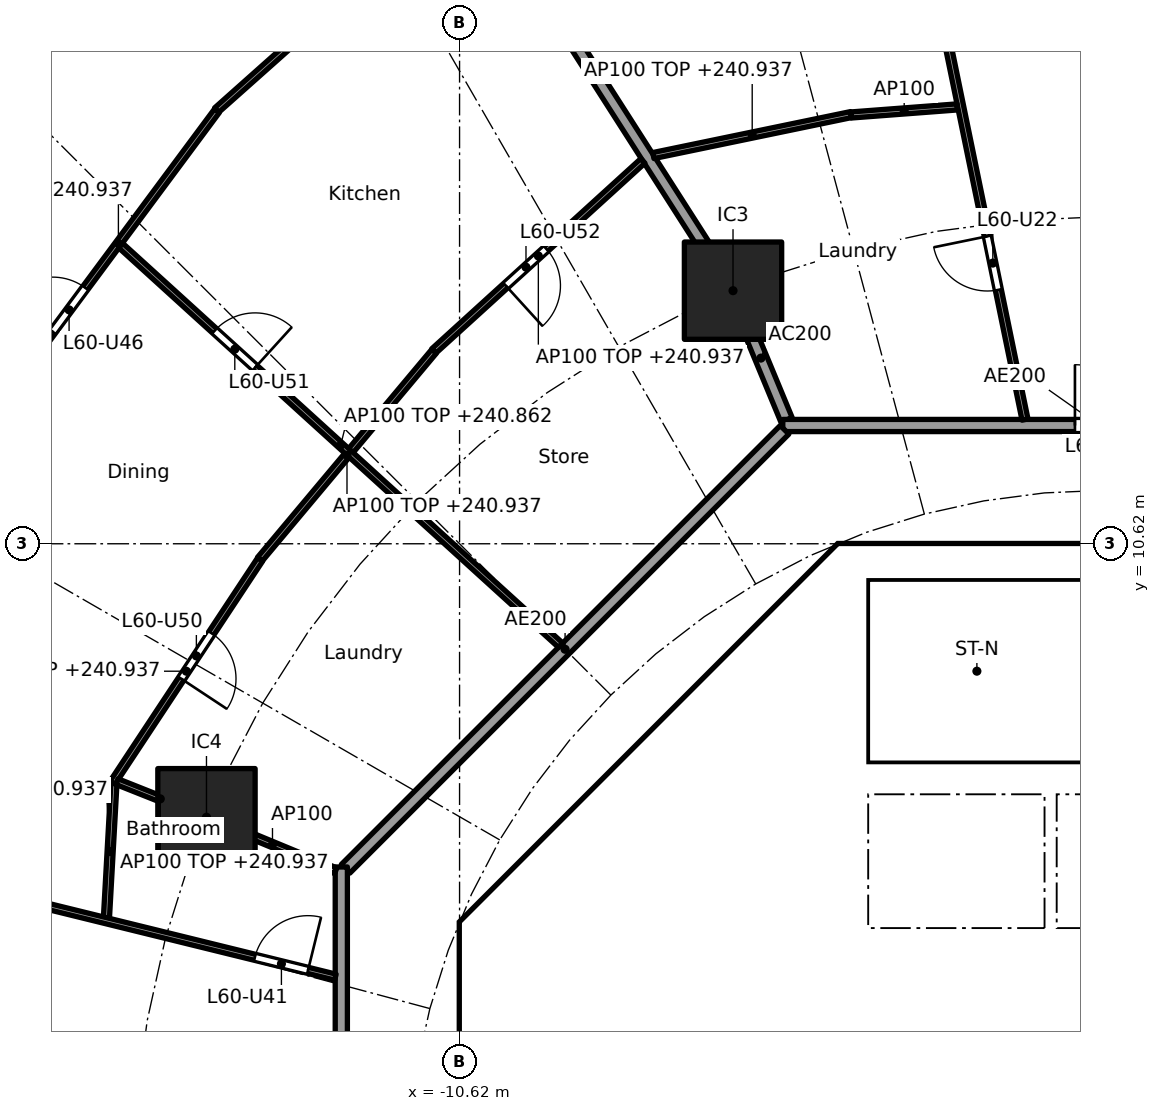
"""IFC4 building model, lengths in metres.
Left out: names, types, materials, properties, quantities, classifications, styles, units other than length and angle.
Written with IfcOpenShell. Run it as: python <this file> out.ifc"""

import sys

from ifc_helpers import new_model, si_unit, direction, frame, frame_2d, origin, origin_2d, place, context, subcontext, project, spatial, polyline, rectangle, outline, extrude, element, fill, save


model = new_model("IFC4")
c1 = context("Model", 3, precision=1e-05, world=origin(), true_north=direction((0.0, 1.0)))
c2 = subcontext(c1, "Body", "Model", "MODEL_VIEW")
j1 = project(units=[si_unit("LENGTHUNIT", "METRE"), si_unit("PLANEANGLEUNIT", "RADIAN")], contexts=[c1])
p1 = place(None, origin())
s1 = spatial("IfcSite", under=j1, at=p1, CompositionType="ELEMENT")
p2 = place(p1, origin())
s2 = spatial("IfcBuilding", under=s1, at=p2, CompositionType="ELEMENT")
p3 = place(p2, frame((0.0, 0.0, 238.1)))
s3 = spatial("IfcBuildingStorey", under=s2, at=p3, CompositionType="ELEMENT", Elevation=238.1)
for number, where, z_axis, x_axis in (
    (1, (-6.123, 14.782, 0.0), (0.0, 0.0, 1.0), (1.0, 0.0, 0.0)),
    (2, (-14.782, 6.123, 0.0), (0.0, 0.0, 1.0), (1.0, 0.0, 0.0)),
):
    element("IfcColumn", number, at=place(p3, frame(where, z_axis=z_axis, x_axis=x_axis)), inside=s3, PredefinedType="COLUMN", context=c2, shape_type="SweptSolid", body=[
        extrude(rectangle(XDim=1.6, YDim=1.6, at=origin_2d()), origin(), (0.0, 0.0, 1.0), 3.7),
    ])
p4 = place(p3, frame((-4.613, 9.988, 0.0), z_axis=(0.0, 0.0, 1.0), x_axis=(-0.707106781187, -0.707106781187, 0.0)))
e3 = element("IfcWall", 3, at=p4, inside=s3, PredefinedType="SHEAR", context=c2, shape_type="SweptSolid", body=[
    extrude(rectangle(XDim=7.602, YDim=0.6, at=frame_2d((3.801, 0.0))), origin(), (0.0, 0.0, 1.0), 3.44),
])
p5 = place(p4, frame((0.351, 0.0, 0.0)))
e4 = element("IfcOpeningElement", 4, at=p5, cuts=e3, PredefinedType="OPENING", context=c2, shape_type="SweptSolid", body=[
    extrude(rectangle(XDim=1.1, YDim=2.1, at=frame_2d((0.55, 1.05))), frame((0.0, 0.31, 0.0), z_axis=(0.0, -1.0, 0.0), x_axis=(1.0, 0.0, 0.0)), (0.0, 0.0, 1.0), 0.62),
])
p6 = place(p3, frame((-10.325, 3.801, 0.0), z_axis=(0.0, 0.0, 1.0), x_axis=(0.0, -1.0, 0.0)))
e5 = element("IfcWall", 5, at=p6, inside=s3, PredefinedType="SHEAR", context=c2, shape_type="SweptSolid", body=[
    extrude(rectangle(XDim=7.602, YDim=0.6, at=frame_2d((3.801, 0.0))), origin(), (0.0, 0.0, 1.0), 3.44),
])
p7 = place(p6, frame((0.651, 0.0, 0.0)))
e6 = element("IfcOpeningElement", 6, at=p7, cuts=e5, PredefinedType="OPENING", context=c2, shape_type="SweptSolid", body=[
    extrude(rectangle(XDim=1.5, YDim=2.1, at=frame_2d((0.75, 1.05))), frame((0.0, 0.31, 0.0), z_axis=(0.0, -1.0, 0.0), x_axis=(1.0, 0.0, 0.0)), (0.0, 0.0, 1.0), 0.62),
])
p8 = place(p6, frame((5.451, 0.0, 0.0)))
e7 = element("IfcOpeningElement", 7, at=p8, cuts=e5, PredefinedType="OPENING", context=c2, shape_type="SweptSolid", body=[
    extrude(rectangle(XDim=1.5, YDim=2.1, at=frame_2d((0.75, 1.05))), frame((0.0, 0.31, 0.0), z_axis=(0.0, -1.0, 0.0), x_axis=(1.0, 0.0, 0.0)), (0.0, 0.0, 1.0), 0.62),
])
p9 = place(p3, frame((-7.0, 4.1, 0.0), z_axis=(0.0, 0.0, 1.0), x_axis=(0.0, 1.0, 0.0)))
e8 = element("IfcWall", 8, at=p9, inside=s3, PredefinedType="PARTITIONING", context=c2, shape_type="SweptSolid", body=[
    extrude(rectangle(XDim=2.927, YDim=0.15, at=frame_2d((1.463, 0.0))), origin(), (0.0, 0.0, 1.0), 3.44),
])
p10 = place(p9, frame((1.051, 0.0, 0.0)))
e9 = element("IfcOpeningElement", 9, at=p10, cuts=e8, PredefinedType="OPENING", context=c2, shape_type="SweptSolid", body=[
    extrude(rectangle(XDim=0.9, YDim=2.1, at=frame_2d((0.45, 1.05))), frame((0.0, 0.085, 0.0), z_axis=(0.0, -1.0, 0.0), x_axis=(1.0, 0.0, 0.0)), (0.0, 0.0, 1.0), 0.17),
])
p11 = place(p3, frame((-4.0, 4.3, 0.0), z_axis=(0.0, 0.0, 1.0), x_axis=(0.0, 1.0, 0.0)))
e10 = element("IfcWall", 10, at=p11, inside=s3, PredefinedType="SOLIDWALL", context=c2, shape_type="SweptSolid", body=[
    extrude(rectangle(XDim=2.2, YDim=0.2, at=frame_2d((1.1, 0.0))), origin(), (0.0, 0.0, 1.0), 3.44),
])
p12 = place(p11, frame((0.55, 0.0, 0.0)))
e11 = element("IfcOpeningElement", 11, at=p12, cuts=e10, PredefinedType="OPENING", context=c2, shape_type="SweptSolid", body=[
    extrude(rectangle(XDim=1.1, YDim=2.1, at=frame_2d((0.55, 1.05))), frame((0.0, 0.11, 0.0), z_axis=(0.0, -1.0, 0.0), x_axis=(1.0, 0.0, 0.0)), (0.0, 0.0, 1.0), 0.22),
])
p13 = place(p3, origin())
e12 = element("IfcWall", 12, at=p13, inside=s3, PredefinedType="SHEAR", context=c2, shape_type="SweptSolid", body=[
    extrude(outline(polyline([(-10.2, 4.825), (-9.776, 4.401), (-10.025, 4.152), (-10.025, 3.801), (-10.625, 3.801), (-10.625, 4.401), (-10.2, 4.825)])), origin(), (0.0, 0.0, 1.0), 3.44),
])
p14 = place(p3, origin())
e13 = element("IfcWall", 13, at=p14, inside=s3, PredefinedType="SHEAR", context=c2, shape_type="SweptSolid", body=[
    extrude(outline(polyline([(-4.152, 10.025), (-4.401, 9.776), (-4.825, 10.2), (-4.401, 10.625), (4.401, 10.625), (4.825, 10.2), (4.401, 9.776), (4.152, 10.025), (-4.152, 10.025)])), origin(), (0.0, 0.0, 1.0), 3.44),
])
p15 = place(p3, frame((-0.9, 4.3, 0.0), z_axis=(0.0, 0.0, 1.0), x_axis=(0.0, 1.0, 0.0)))
e14 = element("IfcWall", 14, at=p15, inside=s3, PredefinedType="SOLIDWALL", context=c2, shape_type="SweptSolid", body=[
    extrude(rectangle(XDim=2.2, YDim=0.2, at=frame_2d((1.1, 0.0))), origin(), (0.0, 0.0, 1.0), 3.44),
])
p16 = place(p3, origin())
e15 = element("IfcWall", 15, at=p16, inside=s3, PredefinedType="SOLIDWALL", context=c2, shape_type="SweptSolid", body=[
    extrude(outline(polyline([(-6.7, 4.3), (6.7, 4.3), (6.7, 2.1), (6.5, 2.1), (6.5, 4.1), (4.5, 4.1), (4.5, 2.1), (4.3, 2.1), (4.3, 4.1), (2.3, 4.1), (2.3, 2.1), (2.1, 2.1), (2.1, 4.1), (0.1, 4.1), (0.1, 2.1), (-0.1, 2.1), (-0.1, 4.1), (-6.5, 4.1), (-6.5, 2.1), (-6.7, 2.1), (-6.7, 4.3)])), origin(), (0.0, 0.0, 1.0), 3.44),
])
p17 = place(p3, frame((-10.025, 4.0, 0.0), z_axis=(0.0, 0.0, 1.0), x_axis=(1.0, 0.0, 0.0)))
e16 = element("IfcWall", 16, at=p17, inside=s3, PredefinedType="PARTITIONING", context=c2, shape_type="SweptSolid", body=[
    extrude(rectangle(XDim=3.325, YDim=0.2, at=frame_2d((1.662, 0.0))), origin(), (0.0, 0.0, 1.0), 3.44),
])
p18 = place(p3, origin())
e17 = element("IfcWall", 17, at=p18, inside=s3, PredefinedType="SOLIDWALL", context=c2, shape_type="SweptSolid", body=[
    extrude(outline(polyline([(-3.9, 7.025), (-4.1, 7.025), (-4.1, 10.025), (-3.9, 10.025), (-3.9, 7.025)])), origin(), (0.0, 0.0, 1.0), 3.44),
])
p19 = place(p3, origin())
e18 = element("IfcWall", 18, at=p19, inside=s3, PredefinedType="SOLIDWALL", context=c2, shape_type="SweptSolid", body=[
    extrude(outline(polyline([(4.1, 6.5), (-4.1, 6.5), (-4.1, 7.025), (4.1, 7.025), (4.1, 6.5)])), origin(), (0.0, 0.0, 1.0), 3.44),
])
p20 = place(p3, frame((-5.243, 12.657, 0.0), z_axis=(0.0, 0.0, 1.0), x_axis=(-0.382691608661, 0.923876145736, 0.0)))
e19 = element("IfcWall", 19, at=p20, inside=s3, PredefinedType="PARTITIONING", context=c2, shape_type="SweptSolid", body=[
    extrude(rectangle(XDim=2.2, YDim=0.2, at=frame_2d((1.1, 0.0))), origin(), (0.0, 0.0, 1.0), 3.44),
])
p21 = place(p3, frame((-6.15, 14.824, 0.0), z_axis=(0.0, 0.0, 1.0), x_axis=(-0.538870687577, 0.842388498301, 0.0)))
e20 = element("IfcWall", 20, at=p21, inside=s3, PredefinedType="PARTITIONING", context=c2, shape_type="SweptSolid", body=[
    extrude(rectangle(XDim=13.213, YDim=0.2, at=frame_2d((6.606, 0.0))), origin(), (0.0, 0.0, 1.0), 2.837),
])
p22 = place(p3, frame((5.104, 12.565, 0.0), z_axis=(0.0, 0.0, 1.0), x_axis=(-1.0, 0.0, 0.0)))
e21 = element("IfcWall", 21, at=p22, inside=s3, PredefinedType="PARTITIONING", context=c2, shape_type="SweptSolid", body=[
    extrude(rectangle(XDim=10.409, YDim=0.2, at=frame_2d((5.205, 0.0))), origin(), (0.0, 0.0, 1.0), 3.44),
])
p23 = place(p22, frame((4.604, 0.0, 0.0)))
e22 = element("IfcOpeningElement", 22, at=p23, cuts=e21, PredefinedType="OPENING", context=c2, shape_type="SweptSolid", body=[
    extrude(rectangle(XDim=1.0, YDim=2.1, at=frame_2d((0.5, 1.05))), frame((0.0, 0.11, 0.0), z_axis=(0.0, -1.0, 0.0), x_axis=(1.0, 0.0, 0.0)), (0.0, 0.0, 1.0), 0.22),
])
p24 = place(p3, frame((-5.275, 12.494, 0.0), z_axis=(0.0, 0.0, 1.0), x_axis=(-0.707106781187, -0.707106781187, 0.0)))
e23 = element("IfcWall", 23, at=p24, inside=s3, PredefinedType="PARTITIONING", context=c2, shape_type="SweptSolid", body=[
    extrude(rectangle(XDim=10.209, YDim=0.2, at=frame_2d((5.104, 0.0))), origin(), (0.0, 0.0, 1.0), 3.44),
])
p25 = place(p3, frame((-12.565, 5.304, 0.0), z_axis=(0.0, 0.0, 1.0), x_axis=(0.0, -1.0, 0.0)))
e24 = element("IfcWall", 24, at=p25, inside=s3, PredefinedType="PARTITIONING", context=c2, shape_type="SweptSolid", body=[
    extrude(rectangle(XDim=10.409, YDim=0.2, at=frame_2d((5.205, 0.0))), origin(), (0.0, 0.0, 1.0), 3.44),
])
p26 = place(p25, frame((3.07, 0.0, 0.0)))
e25 = element("IfcOpeningElement", 25, at=p26, cuts=e24, PredefinedType="OPENING", context=c2, shape_type="SweptSolid", body=[
    extrude(rectangle(XDim=1.0, YDim=2.1, at=frame_2d((0.5, 1.05))), frame((0.0, 0.11, 0.0), z_axis=(0.0, -1.0, 0.0), x_axis=(1.0, 0.0, 0.0)), (0.0, 0.0, 1.0), 0.22),
])
p27 = place(p3, frame((-1.321, 12.663, 0.0), z_axis=(0.0, 0.0, 1.0), x_axis=(-0.201366062305, 0.979516058547, 0.0)))
e26 = element("IfcWall", 26, at=p27, inside=s3, PredefinedType="PARTITIONING", context=c2, shape_type="SweptSolid", body=[
    extrude(rectangle(XDim=17.939, YDim=0.1, at=frame_2d((8.969, 0.0))), origin(), (0.0, 0.0, 1.0), 2.762),
])
p28 = place(p27, frame((2.177, 0.0, 0.0)))
e27 = element("IfcOpeningElement", 27, at=p28, cuts=e26, PredefinedType="OPENING", context=c2, shape_type="SweptSolid", body=[
    extrude(rectangle(XDim=0.9, YDim=2.1, at=frame_2d((0.45, 1.05))), frame((0.0, 0.06, 0.0), z_axis=(0.0, -1.0, 0.0), x_axis=(1.0, 0.0, 0.0)), (0.0, 0.0, 1.0), 0.12),
])
p29 = place(p27, frame((7.659, 0.0, 0.0)))
e28 = element("IfcOpeningElement", 28, at=p29, cuts=e26, PredefinedType="OPENING", context=c2, shape_type="SweptSolid", body=[
    extrude(rectangle(XDim=0.9, YDim=2.1, at=frame_2d((0.45, 1.05))), frame((0.0, 0.06, 0.0), z_axis=(0.0, -1.0, 0.0), x_axis=(1.0, 0.0, 0.0)), (0.0, 0.0, 1.0), 0.12),
])
p30 = place(p27, frame((14.002, 0.0, 0.0)))
e29 = element("IfcOpeningElement", 29, at=p30, cuts=e26, PredefinedType="OPENING", context=c2, shape_type="SweptSolid", body=[
    extrude(rectangle(XDim=0.9, YDim=2.1, at=frame_2d((0.45, 1.05))), frame((0.0, 0.06, 0.0), z_axis=(0.0, -1.0, 0.0), x_axis=(1.0, 0.0, 0.0)), (0.0, 0.0, 1.0), 0.12),
])
p31 = place(p3, frame((-2.435, 17.804, 0.0), z_axis=(0.0, 0.0, 1.0), x_axis=(-0.997128664551, -0.075725995084, 0.0)))
e30 = element("IfcWall", 30, at=p31, inside=s3, PredefinedType="PARTITIONING", context=c2, shape_type="SweptSolid", body=[
    extrude(rectangle(XDim=1.751, YDim=0.1, at=frame_2d((0.875, 0.0))), origin(), (0.0, 0.0, 1.0), 3.44),
])
p32 = place(p3, frame((-4.182, 17.678, 0.0), z_axis=(0.0, 0.0, 1.0), x_axis=(-0.979196996208, -0.202911908517, 0.0)))
e31 = element("IfcWall", 31, at=p32, inside=s3, PredefinedType="PARTITIONING", context=c2, shape_type="SweptSolid", body=[
    extrude(rectangle(XDim=3.321, YDim=0.1, at=frame_2d((1.66, 0.0))), origin(), (0.0, 0.0, 1.0), 2.837),
])
p33 = place(p3, frame((-7.605, 16.917, 0.0), z_axis=(0.0, 0.0, 1.0), x_axis=(-0.739828340504, -0.672795679673, 0.0)))
e32 = element("IfcWall", 32, at=p33, inside=s3, PredefinedType="PARTITIONING", context=c2, shape_type="SweptSolid", body=[
    extrude(rectangle(XDim=4.647, YDim=0.1, at=frame_2d((2.324, 0.0))), origin(), (0.0, 0.0, 1.0), 2.837),
])
p34 = place(p33, frame((2.148, 0.0, 0.0)))
e33 = element("IfcOpeningElement", 33, at=p34, cuts=e32, PredefinedType="OPENING", context=c2, shape_type="SweptSolid", body=[
    extrude(rectangle(XDim=0.9, YDim=2.1, at=frame_2d((0.45, 1.05))), frame((0.0, 0.06, 0.0), z_axis=(0.0, -1.0, 0.0), x_axis=(1.0, 0.0, 0.0)), (0.0, 0.0, 1.0), 0.12),
])
p35 = place(p3, frame((-10.488, 21.422, 0.0), z_axis=(0.0, 0.0, 1.0), x_axis=(-0.747153269812, -0.66465178207, 0.0)))
e34 = element("IfcWall", 34, at=p35, inside=s3, PredefinedType="PARTITIONING", context=c2, shape_type="SweptSolid", body=[
    extrude(rectangle(XDim=5.525, YDim=0.1, at=frame_2d((2.762, 0.0))), origin(), (0.0, 0.0, 1.0), 2.837),
])
p36 = place(p3, frame((-11.039, 13.785, 0.0), z_axis=(0.0, 0.0, 1.0), x_axis=(-0.642254625966, -0.766491353784, 0.0)))
e35 = element("IfcWall", 35, at=p36, inside=s3, PredefinedType="PARTITIONING", context=c2, shape_type="SweptSolid", body=[
    extrude(rectangle(XDim=4.461, YDim=0.1, at=frame_2d((2.23, 0.0))), origin(), (0.0, 0.0, 1.0), 2.837),
])
p37 = place(p3, frame((-14.608, 17.743, 0.0), z_axis=(0.0, 0.0, 1.0), x_axis=(-0.596174489482, -0.8028548923, 0.0)))
e36 = element("IfcWall", 36, at=p37, inside=s3, PredefinedType="PARTITIONING", context=c2, shape_type="SweptSolid", body=[
    extrude(rectangle(XDim=5.442, YDim=0.1, at=frame_2d((2.721, 0.0))), origin(), (0.0, 0.0, 1.0), 2.837),
])
p38 = place(p37, frame((3.631, 0.0, 0.0)))
e37 = element("IfcOpeningElement", 37, at=p38, cuts=e36, PredefinedType="OPENING", context=c2, shape_type="SweptSolid", body=[
    extrude(rectangle(XDim=0.9, YDim=2.1, at=frame_2d((0.45, 1.05))), frame((0.0, 0.06, 0.0), z_axis=(0.0, -1.0, 0.0), x_axis=(1.0, 0.0, 0.0)), (0.0, 0.0, 1.0), 0.12),
])
p39 = place(p3, frame((-8.959, 8.952, 0.0), z_axis=(0.0, 0.0, 1.0), x_axis=(-0.740140081805, 0.672452719011, 0.0)))
e38 = element("IfcWall", 38, at=p39, inside=s3, PredefinedType="PARTITIONING", context=c2, shape_type="SweptSolid", body=[
    extrude(rectangle(XDim=9.775, YDim=0.1, at=frame_2d((4.887, 0.0))), origin(), (0.0, 0.0, 1.0), 2.762),
])
p40 = place(p39, frame((6.789, 0.0, 0.0)))
e39 = element("IfcOpeningElement", 39, at=p40, cuts=e38, PredefinedType="OPENING", context=c2, shape_type="SweptSolid", body=[
    extrude(rectangle(XDim=0.9, YDim=2.1, at=frame_2d((0.45, 1.05))), frame((0.0, 0.06, 0.0), z_axis=(0.0, -1.0, 0.0), x_axis=(1.0, 0.0, 0.0)), (0.0, 0.0, 1.0), 0.12),
])
p41 = place(p3, frame((-13.899, 10.363, 0.0), z_axis=(0.0, 0.0, 1.0), x_axis=(-0.55129513787, -0.834310296569, 0.0)))
e40 = element("IfcWall", 40, at=p41, inside=s3, PredefinedType="PARTITIONING", context=c2, shape_type="SweptSolid", body=[
    extrude(rectangle(XDim=4.407, YDim=0.1, at=frame_2d((2.204, 0.0))), origin(), (0.0, 0.0, 1.0), 2.837),
])
p42 = place(p41, frame((1.453, 0.0, 0.0)))
e41 = element("IfcOpeningElement", 41, at=p42, cuts=e40, PredefinedType="OPENING", context=c2, shape_type="SweptSolid", body=[
    extrude(rectangle(XDim=0.9, YDim=2.1, at=frame_2d((0.45, 1.05))), frame((0.0, 0.06, 0.0), z_axis=(0.0, -1.0, 0.0), x_axis=(1.0, 0.0, 0.0)), (0.0, 0.0, 1.0), 0.12),
])
p43 = place(p3, frame((-12.657, 5.243, 0.0), z_axis=(0.0, 0.0, 1.0), x_axis=(-0.923864733477, 0.382719158442, 0.0)))
e42 = element("IfcWall", 42, at=p43, inside=s3, PredefinedType="PARTITIONING", context=c2, shape_type="SweptSolid", body=[
    extrude(rectangle(XDim=2.25, YDim=0.1, at=frame_2d((1.125, 0.0))), origin(), (0.0, 0.0, 1.0), 3.44),
])
p44 = place(p3, frame((-14.829, 6.141, 0.0), z_axis=(0.0, 0.0, 1.0), x_axis=(-0.929177051194, 0.369634965248, 0.0)))
e43 = element("IfcWall", 43, at=p44, inside=s3, PredefinedType="PARTITIONING", context=c2, shape_type="SweptSolid", body=[
    extrude(rectangle(XDim=1.535, YDim=0.1, at=frame_2d((0.768, 0.0))), origin(), (0.0, 0.0, 1.0), 2.837),
])
p45 = place(p3, frame((-16.304, 6.677, 0.0), z_axis=(0.0, 0.0, 1.0), x_axis=(-0.055638870195, -0.998450958297, 0.0)))
e44 = element("IfcWall", 44, at=p45, inside=s3, PredefinedType="PARTITIONING", context=c2, shape_type="SweptSolid", body=[
    extrude(rectangle(XDim=2.242, YDim=0.1, at=frame_2d((1.121, 0.0))), origin(), (0.0, 0.0, 1.0), 2.837),
])
p46 = place(p3, frame((-12.662, 3.494, 0.0), z_axis=(0.0, 0.0, 1.0), x_axis=(-0.971037272035, 0.238928056784, 0.0)))
e45 = element("IfcWall", 45, at=p46, inside=s3, PredefinedType="PARTITIONING", context=c2, shape_type="SweptSolid", body=[
    extrude(rectangle(XDim=13.35, YDim=0.1, at=frame_2d((6.675, 0.0))), origin(), (0.0, 0.0, 1.0), 2.762),
])
p47 = place(p46, frame((0.464, 0.0, 0.0)))
e46 = element("IfcOpeningElement", 46, at=p47, cuts=e45, PredefinedType="OPENING", context=c2, shape_type="SweptSolid", body=[
    extrude(rectangle(XDim=0.9, YDim=2.1, at=frame_2d((0.45, 1.05))), frame((0.0, 0.06, 0.0), z_axis=(0.0, -1.0, 0.0), x_axis=(1.0, 0.0, 0.0)), (0.0, 0.0, 1.0), 0.12),
])
p48 = place(p46, frame((5.56, 0.0, 0.0)))
e47 = element("IfcOpeningElement", 47, at=p48, cuts=e45, PredefinedType="OPENING", context=c2, shape_type="SweptSolid", body=[
    extrude(rectangle(XDim=0.9, YDim=2.1, at=frame_2d((0.45, 1.05))), frame((0.0, 0.06, 0.0), z_axis=(0.0, -1.0, 0.0), x_axis=(1.0, 0.0, 0.0)), (0.0, 0.0, 1.0), 0.12),
])
p49 = place(p46, frame((10.293, 0.0, 0.0)))
e48 = element("IfcOpeningElement", 48, at=p49, cuts=e45, PredefinedType="OPENING", context=c2, shape_type="SweptSolid", body=[
    extrude(rectangle(XDim=0.9, YDim=2.1, at=frame_2d((0.45, 1.05))), frame((0.0, 0.06, 0.0), z_axis=(0.0, -1.0, 0.0), x_axis=(1.0, 0.0, 0.0)), (0.0, 0.0, 1.0), 0.12),
])
p50 = place(p12, origin())
e49 = element("IfcDoor", 49, at=p50, inside=s3, OperationType="DOUBLE_DOOR_SLIDING", PredefinedType="DOOR", context=c2, shape_type="SweptSolid", body=[
    extrude(rectangle(XDim=1.1, YDim=2.1, at=frame_2d((0.55, 1.05))), frame((0.0, 0.025, 0.0), z_axis=(0.0, -1.0, 0.0), x_axis=(1.0, 0.0, 0.0)), (0.0, 0.0, 1.0), 0.05),
])
fill(e11, e49)
p51 = place(p10, origin())
e50 = element("IfcDoor", 50, at=p51, inside=s3, OperationType="SINGLE_SWING_RIGHT", PredefinedType="DOOR", context=c2, shape_type="SweptSolid", body=[
    extrude(rectangle(XDim=0.9, YDim=2.1, at=frame_2d((0.45, 1.05))), frame((0.0, 0.025, 0.0), z_axis=(0.0, -1.0, 0.0), x_axis=(1.0, 0.0, 0.0)), (0.0, 0.0, 1.0), 0.05),
])
fill(e9, e50)
p52 = place(p7, origin())
e51 = element("IfcDoor", 51, at=p52, inside=s3, OperationType="DOUBLE_DOOR_SINGLE_SWING", PredefinedType="DOOR", context=c2, shape_type="SweptSolid", body=[
    extrude(rectangle(XDim=1.5, YDim=2.1, at=frame_2d((0.75, 1.05))), frame((0.0, 0.025, 0.0), z_axis=(0.0, -1.0, 0.0), x_axis=(1.0, 0.0, 0.0)), (0.0, 0.0, 1.0), 0.05),
])
fill(e6, e51)
p53 = place(p5, origin())
e52 = element("IfcDoor", 52, at=p53, inside=s3, OperationType="SINGLE_SWING_LEFT", PredefinedType="DOOR", context=c2, shape_type="SweptSolid", body=[
    extrude(rectangle(XDim=1.1, YDim=2.1, at=frame_2d((0.55, 1.05))), frame((0.0, 0.025, 0.0), z_axis=(0.0, -1.0, 0.0), x_axis=(1.0, 0.0, 0.0)), (0.0, 0.0, 1.0), 0.05),
])
fill(e4, e52)
p54 = place(p23, frame((1.0, 0.0, 0.0), x_axis=(-1.0, 0.0, 0.0)))
e53 = element("IfcDoor", 53, at=p54, inside=s3, OperationType="SINGLE_SWING_LEFT", PredefinedType="DOOR", context=c2, shape_type="SweptSolid", body=[
    extrude(rectangle(XDim=1.0, YDim=2.1, at=frame_2d((0.5, 1.05))), frame((0.0, 0.025, 0.0), z_axis=(0.0, -1.0, 0.0), x_axis=(1.0, 0.0, 0.0)), (0.0, 0.0, 1.0), 0.05),
])
fill(e22, e53)
p55 = place(p28, origin())
e54 = element("IfcDoor", 54, at=p55, inside=s3, OperationType="SINGLE_SWING_RIGHT", PredefinedType="DOOR", context=c2, shape_type="SweptSolid", body=[
    extrude(rectangle(XDim=0.9, YDim=2.1, at=frame_2d((0.45, 1.05))), frame((0.0, 0.025, 0.0), z_axis=(0.0, -1.0, 0.0), x_axis=(1.0, 0.0, 0.0)), (0.0, 0.0, 1.0), 0.05),
])
fill(e27, e54)
p56 = place(p47, frame((0.9, 0.0, 0.0), x_axis=(-1.0, 0.0, 0.0)))
e55 = element("IfcDoor", 55, at=p56, inside=s3, OperationType="SINGLE_SWING_RIGHT", PredefinedType="DOOR", context=c2, shape_type="SweptSolid", body=[
    extrude(rectangle(XDim=0.9, YDim=2.1, at=frame_2d((0.45, 1.05))), frame((0.0, 0.025, 0.0), z_axis=(0.0, -1.0, 0.0), x_axis=(1.0, 0.0, 0.0)), (0.0, 0.0, 1.0), 0.05),
])
fill(e46, e55)
p57 = place(p38, frame((0.9, 0.0, 0.0), x_axis=(-1.0, 0.0, 0.0)))
e56 = element("IfcDoor", 56, at=p57, inside=s3, OperationType="SINGLE_SWING_LEFT", PredefinedType="DOOR", context=c2, shape_type="SweptSolid", body=[
    extrude(rectangle(XDim=0.9, YDim=2.1, at=frame_2d((0.45, 1.05))), frame((0.0, 0.025, 0.0), z_axis=(0.0, -1.0, 0.0), x_axis=(1.0, 0.0, 0.0)), (0.0, 0.0, 1.0), 0.05),
])
fill(e37, e56)
p58 = place(p42, origin())
e57 = element("IfcDoor", 57, at=p58, inside=s3, OperationType="SINGLE_SWING_RIGHT", PredefinedType="DOOR", context=c2, shape_type="SweptSolid", body=[
    extrude(rectangle(XDim=0.9, YDim=2.1, at=frame_2d((0.45, 1.05))), frame((0.0, 0.025, 0.0), z_axis=(0.0, -1.0, 0.0), x_axis=(1.0, 0.0, 0.0)), (0.0, 0.0, 1.0), 0.05),
])
fill(e41, e57)
p59 = place(p40, frame((0.9, 0.0, 0.0), x_axis=(-1.0, 0.0, 0.0)))
e58 = element("IfcDoor", 58, at=p59, inside=s3, OperationType="SINGLE_SWING_RIGHT", PredefinedType="DOOR", context=c2, shape_type="SweptSolid", body=[
    extrude(rectangle(XDim=0.9, YDim=2.1, at=frame_2d((0.45, 1.05))), frame((0.0, 0.025, 0.0), z_axis=(0.0, -1.0, 0.0), x_axis=(1.0, 0.0, 0.0)), (0.0, 0.0, 1.0), 0.05),
])
fill(e39, e58)
p60 = place(p34, origin())
e59 = element("IfcDoor", 59, at=p60, inside=s3, OperationType="SINGLE_SWING_RIGHT", PredefinedType="DOOR", context=c2, shape_type="SweptSolid", body=[
    extrude(rectangle(XDim=0.9, YDim=2.1, at=frame_2d((0.45, 1.05))), frame((0.0, 0.025, 0.0), z_axis=(0.0, -1.0, 0.0), x_axis=(1.0, 0.0, 0.0)), (0.0, 0.0, 1.0), 0.05),
])
fill(e33, e59)
save(model, sys.argv[1])
